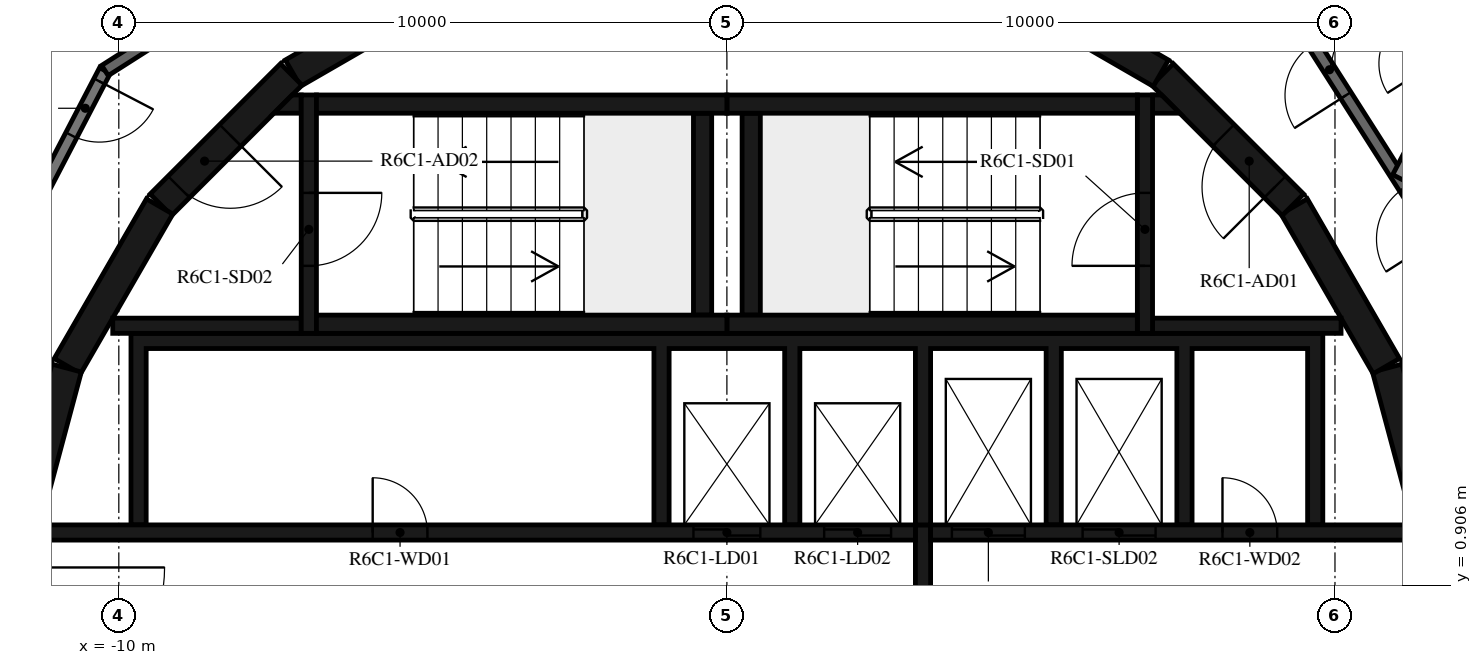
"""IFC4 building model, lengths in metres.
Left out: names, types, materials, properties, quantities, classifications, styles, units other than length and angle.
Written with IfcOpenShell. Run it as: python <this file> out.ifc"""

import sys

from ifc_helpers import new_model, si_unit, direction, frame, frame_2d, origin, place, context, subcontext, project, spatial, polyline, rectangle, outline, extrude, element, fill, save


model = new_model("IFC4")
c1 = context("Model", 3, precision=1e-05, world=origin(), true_north=direction((0.0, 1.0)))
c2 = subcontext(c1, "Body", "Model", "MODEL_VIEW")
j1 = project(units=[si_unit("LENGTHUNIT", "METRE"), si_unit("PLANEANGLEUNIT", "RADIAN")], contexts=[c1])
p1 = place(None, origin())
s1 = spatial("IfcSite", under=j1, at=p1, CompositionType="ELEMENT")
p2 = place(p1, origin())
s2 = spatial("IfcBuilding", under=s1, at=p2, CompositionType="ELEMENT")
p3 = place(p2, frame((0.0, 0.0, 251.2)))
s3 = spatial("IfcBuildingStorey", under=s2, at=p3, CompositionType="ELEMENT", Elevation=251.2)
for number, where, z_axis, x_axis in (
    (1, (11.643, 1.55, 0.0), (0.0, 0.0, 1.0), (-0.259, 0.966, 0.0)),
    (2, (10.845, 4.51, 0.0), (0.0, 0.0, 1.0), (-0.5, 0.866, 0.0)),
):
    element("IfcWall", number, at=place(p3, frame(where, z_axis=z_axis, x_axis=x_axis)), inside=s3, PredefinedType="SHEAR", context=c2, shape_type="SweptSolid", body=[
        extrude(rectangle(XDim=3.033, YDim=0.5, at=frame_2d((1.516, 0.0))), origin(), (0.0, 0.0, 1.0), 3.12),
    ])
p4 = place(p3, frame((9.308, 7.164, 0.0), z_axis=(0.0, 0.0, 1.0), x_axis=(-0.707106781187, 0.707106781187, 0.0)))
e3 = element("IfcWall", 3, at=p4, inside=s3, PredefinedType="SHEAR", context=c2, shape_type="SweptSolid", body=[
    extrude(rectangle(XDim=3.032, YDim=0.5, at=frame_2d((1.516, 0.0))), origin(), (0.0, 0.0, 1.0), 3.12),
])
p5 = place(p4, frame((0.416, 0.0, 0.0)))
e4 = element("IfcOpeningElement", 4, at=p5, cuts=e3, PredefinedType="OPENING", context=c2, shape_type="SweptSolid", body=[
    extrude(rectangle(XDim=1.2, YDim=2.1, at=frame_2d((0.6, 1.05))), frame((0.0, 0.26, 0.0), z_axis=(0.0, -1.0, 0.0), x_axis=(1.0, 0.0, 0.0)), (0.0, 0.0, 1.0), 0.52),
])
for number, where, z_axis, x_axis in (
    (5, (7.137, 9.329, 0.0), (0.0, 0.0, 1.0), (-0.866, 0.5, 0.0)),
    (6, (-4.51, 10.845, 0.0), (0.0, 0.0, 1.0), (-0.866, -0.5, 0.0)),
):
    element("IfcWall", number, at=place(p3, frame(where, z_axis=z_axis, x_axis=x_axis)), inside=s3, PredefinedType="SHEAR", context=c2, shape_type="SweptSolid", body=[
        extrude(rectangle(XDim=3.033, YDim=0.5, at=frame_2d((1.516, 0.0))), origin(), (0.0, 0.0, 1.0), 3.12),
    ])
p6 = place(p3, frame((-7.164, 9.308, 0.0), z_axis=(0.0, 0.0, 1.0), x_axis=(-0.707106781187, -0.707106781187, 0.0)))
e7 = element("IfcWall", 7, at=p6, inside=s3, PredefinedType="SHEAR", context=c2, shape_type="SweptSolid", body=[
    extrude(rectangle(XDim=3.032, YDim=0.5, at=frame_2d((1.516, 0.0))), origin(), (0.0, 0.0, 1.0), 3.12),
])
p7 = place(p6, frame((1.416, 0.0, 0.0)))
e8 = element("IfcOpeningElement", 8, at=p7, cuts=e7, PredefinedType="OPENING", context=c2, shape_type="SweptSolid", body=[
    extrude(rectangle(XDim=1.2, YDim=2.1, at=frame_2d((0.6, 1.05))), frame((0.0, 0.26, 0.0), z_axis=(0.0, -1.0, 0.0), x_axis=(1.0, 0.0, 0.0)), (0.0, 0.0, 1.0), 0.52),
])
for number, where, z_axis, x_axis in (
    (9, (-9.329, 7.137, 0.0), (0.0, 0.0, 1.0), (-0.5, -0.866, 0.0)),
    (10, (-10.858, 4.479, 0.0), (0.0, 0.0, 1.0), (-0.259, -0.966, 0.0)),
):
    element("IfcWall", number, at=place(p3, frame(where, z_axis=z_axis, x_axis=x_axis)), inside=s3, PredefinedType="SHEAR", context=c2, shape_type="SweptSolid", body=[
        extrude(rectangle(XDim=3.033, YDim=0.5, at=frame_2d((1.516, 0.0))), origin(), (0.0, 0.0, 1.0), 3.12),
    ])
for number, where, z_axis, x_axis in (
    (11, (0.0, 5.2, 0.0), (0.0, 0.0, 1.0), (1.0, 0.0, 0.0)),
    (12, (0.0, 8.82, 0.0), (0.0, 0.0, 1.0), (1.0, 0.0, 0.0)),
):
    element("IfcWall", number, at=place(p3, frame(where, z_axis=z_axis, x_axis=x_axis)), inside=s3, PredefinedType="SHEAR", context=c2, shape_type="SweptSolid", body=[
        extrude(rectangle(XDim=6.75, YDim=0.3, at=frame_2d((3.375, 0.0))), origin(), (0.0, 0.0, 1.0), 3.12),
    ])
p8 = place(p3, frame((0.4, 5.35, 0.0), z_axis=(0.0, 0.0, 1.0), x_axis=(0.0, 1.0, 0.0)))
e13 = element("IfcWall", 13, at=p8, inside=s3, PredefinedType="SHEAR", context=c2, shape_type="SweptSolid", body=[
    extrude(rectangle(XDim=3.32, YDim=0.3, at=frame_2d((1.66, 0.0))), origin(), (0.0, 0.0, 1.0), 3.12),
])
p9 = place(p3, frame((6.875, 5.05, 0.0), z_axis=(0.0, 0.0, 1.0), x_axis=(0.0, 1.0, 0.0)))
e14 = element("IfcWall", 14, at=p9, inside=s3, PredefinedType="SHEAR", context=c2, shape_type="SweptSolid", body=[
    extrude(rectangle(XDim=3.92, YDim=0.25, at=frame_2d((1.96, 0.0))), origin(), (0.0, 0.0, 1.0), 3.12),
])
p10 = place(p9, frame((1.11, 0.0, 0.0)))
e15 = element("IfcOpeningElement", 15, at=p10, cuts=e14, PredefinedType="OPENING", context=c2, shape_type="SweptSolid", body=[
    extrude(rectangle(XDim=1.2, YDim=2.1, at=frame_2d((0.6, 1.05))), frame((0.0, 0.135, 0.0), z_axis=(0.0, -1.0, 0.0), x_axis=(1.0, 0.0, 0.0)), (0.0, 0.0, 1.0), 0.27),
])
p11 = place(p3, frame((7.0, 5.175, 0.0), z_axis=(0.0, 0.0, 1.0), x_axis=(1.0, 0.0, 0.0)))
e16 = element("IfcWall", 16, at=p11, inside=s3, PredefinedType="SHEAR", context=c2, shape_type="SweptSolid", body=[
    extrude(rectangle(XDim=3.1, YDim=0.25, at=frame_2d((1.55, 0.0))), origin(), (0.0, 0.0, 1.0), 3.12),
])
p12 = place(p3, origin())
e17 = element("IfcWall", 17, at=p12, inside=s3, PredefinedType="SHEAR", context=c2, shape_type="SweptSolid", body=[
    extrude(outline(polyline([(7.448, 8.67), (7.0, 8.67), (7.0, 8.97), (7.148, 8.97), (7.448, 8.67)])), origin(), (0.0, 0.0, 1.0), 3.12),
])
for number, where, z_axis, x_axis in (
    (18, (-6.75, 5.2, 0.0), (0.0, 0.0, 1.0), (1.0, 0.0, 0.0)),
    (19, (-6.75, 8.82, 0.0), (0.0, 0.0, 1.0), (1.0, 0.0, 0.0)),
):
    element("IfcWall", number, at=place(p3, frame(where, z_axis=z_axis, x_axis=x_axis)), inside=s3, PredefinedType="SHEAR", context=c2, shape_type="SweptSolid", body=[
        extrude(rectangle(XDim=6.75, YDim=0.3, at=frame_2d((3.375, 0.0))), origin(), (0.0, 0.0, 1.0), 3.12),
    ])
p13 = place(p3, frame((-0.4, 5.35, 0.0), z_axis=(0.0, 0.0, 1.0), x_axis=(0.0, 1.0, 0.0)))
e20 = element("IfcWall", 20, at=p13, inside=s3, PredefinedType="SHEAR", context=c2, shape_type="SweptSolid", body=[
    extrude(rectangle(XDim=3.32, YDim=0.3, at=frame_2d((1.66, 0.0))), origin(), (0.0, 0.0, 1.0), 3.12),
])
p14 = place(p3, frame((-6.875, 8.97, 0.0), z_axis=(0.0, 0.0, 1.0), x_axis=(0.0, -1.0, 0.0)))
e21 = element("IfcWall", 21, at=p14, inside=s3, PredefinedType="SHEAR", context=c2, shape_type="SweptSolid", body=[
    extrude(rectangle(XDim=3.92, YDim=0.25, at=frame_2d((1.96, 0.0))), origin(), (0.0, 0.0, 1.0), 3.12),
])
p15 = place(p14, frame((1.61, 0.0, 0.0)))
e22 = element("IfcOpeningElement", 22, at=p15, cuts=e21, PredefinedType="OPENING", context=c2, shape_type="SweptSolid", body=[
    extrude(rectangle(XDim=1.2, YDim=2.1, at=frame_2d((0.6, 1.05))), frame((0.0, 0.135, 0.0), z_axis=(0.0, -1.0, 0.0), x_axis=(1.0, 0.0, 0.0)), (0.0, 0.0, 1.0), 0.27),
])
p16 = place(p3, frame((-7.0, 5.175, 0.0), z_axis=(0.0, 0.0, 1.0), x_axis=(-1.0, 0.0, 0.0)))
e23 = element("IfcWall", 23, at=p16, inside=s3, PredefinedType="SHEAR", context=c2, shape_type="SweptSolid", body=[
    extrude(rectangle(XDim=3.1, YDim=0.25, at=frame_2d((1.55, 0.0))), origin(), (0.0, 0.0, 1.0), 3.12),
])
p17 = place(p3, origin())
e24 = element("IfcWall", 24, at=p17, inside=s3, PredefinedType="SHEAR", context=c2, shape_type="SweptSolid", body=[
    extrude(outline(polyline([(-7.148, 8.97), (-7.0, 8.97), (-7.0, 8.67), (-7.448, 8.67), (-7.148, 8.97)])), origin(), (0.0, 0.0, 1.0), 3.12),
])
p18 = place(p3, origin())
e25 = element("IfcWall", 25, at=p18, inside=s3, PredefinedType="SHEAR", context=c2, shape_type="SweptSolid", body=[
    extrude(outline(polyline([(-9.55, 4.8), (-1.2, 4.8), (-1.2, 1.9), (-0.95, 1.9), (-0.95, 4.8), (0.95, 4.8), (0.95, 1.9), (1.2, 1.9), (1.2, 4.8), (3.1, 4.8), (3.1, 1.9), (3.35, 1.9), (3.35, 4.8), (5.25, 4.8), (5.25, 1.9), (5.5, 1.9), (5.5, 4.8), (7.4, 4.8), (7.4, 1.9), (7.65, 1.9), (7.65, 4.8), (9.55, 4.8), (9.55, 1.9), (9.8, 1.9), (9.8, 4.8), (9.8, 5.05), (-9.8, 5.05), (-9.8, 4.8), (-9.8, 1.9), (-9.55, 1.9), (-9.55, 4.8)])), origin(), (0.0, 0.0, 1.0), 3.12),
])
p19 = place(p3, frame((-11.28, 1.775, 0.0), z_axis=(0.0, 0.0, 1.0), x_axis=(1.0, 0.0, 0.0)))
e26 = element("IfcWall", 26, at=p19, inside=s3, PredefinedType="SHEAR", context=c2, shape_type="SweptSolid", body=[
    extrude(rectangle(XDim=14.38, YDim=0.25, at=frame_2d((7.19, 0.0))), origin(), (0.0, 0.0, 1.0), 3.12),
])
p20 = place(p19, frame((10.73, 0.0, 0.0)))
e27 = element("IfcOpeningElement", 27, at=p20, cuts=e26, PredefinedType="OPENING", context=c2, shape_type="SweptSolid", body=[
    extrude(rectangle(XDim=1.1, YDim=2.1, at=frame_2d((0.55, 1.05))), frame((0.0, 0.135, 0.0), z_axis=(0.0, -1.0, 0.0), x_axis=(1.0, 0.0, 0.0)), (0.0, 0.0, 1.0), 0.27),
])
p21 = place(p19, frame((12.88, 0.0, 0.0)))
e28 = element("IfcOpeningElement", 28, at=p21, cuts=e26, PredefinedType="OPENING", context=c2, shape_type="SweptSolid", body=[
    extrude(rectangle(XDim=1.1, YDim=2.1, at=frame_2d((0.55, 1.05))), frame((0.0, 0.135, 0.0), z_axis=(0.0, -1.0, 0.0), x_axis=(1.0, 0.0, 0.0)), (0.0, 0.0, 1.0), 0.27),
])
p22 = place(p19, frame((5.455, 0.0, 0.0)))
e29 = element("IfcOpeningElement", 29, at=p22, cuts=e26, PredefinedType="OPENING", context=c2, shape_type="SweptSolid", body=[
    extrude(rectangle(XDim=0.9, YDim=2.1, at=frame_2d((0.45, 1.05))), frame((0.0, 0.135, 0.0), z_axis=(0.0, -1.0, 0.0), x_axis=(1.0, 0.0, 0.0)), (0.0, 0.0, 1.0), 0.27),
])
p23 = place(p3, frame((3.35, 1.775, 0.0), z_axis=(0.0, 0.0, 1.0), x_axis=(1.0, 0.0, 0.0)))
e30 = element("IfcWall", 30, at=p23, inside=s3, PredefinedType="SHEAR", context=c2, shape_type="SweptSolid", body=[
    extrude(rectangle(XDim=7.93, YDim=0.25, at=frame_2d((3.965, 0.0))), origin(), (0.0, 0.0, 1.0), 3.12),
])
p24 = place(p23, frame((0.35, 0.0, 0.0)))
e31 = element("IfcOpeningElement", 31, at=p24, cuts=e30, PredefinedType="OPENING", context=c2, shape_type="SweptSolid", body=[
    extrude(rectangle(XDim=1.2, YDim=2.4, at=frame_2d((0.6, 1.2))), frame((0.0, 0.135, 0.0), z_axis=(0.0, -1.0, 0.0), x_axis=(1.0, 0.0, 0.0)), (0.0, 0.0, 1.0), 0.27),
])
p25 = place(p23, frame((2.5, 0.0, 0.0)))
e32 = element("IfcOpeningElement", 32, at=p25, cuts=e30, PredefinedType="OPENING", context=c2, shape_type="SweptSolid", body=[
    extrude(rectangle(XDim=1.2, YDim=2.4, at=frame_2d((0.6, 1.2))), frame((0.0, 0.135, 0.0), z_axis=(0.0, -1.0, 0.0), x_axis=(1.0, 0.0, 0.0)), (0.0, 0.0, 1.0), 0.27),
])
p26 = place(p23, frame((4.8, 0.0, 0.0)))
e33 = element("IfcOpeningElement", 33, at=p26, cuts=e30, PredefinedType="OPENING", context=c2, shape_type="SweptSolid", body=[
    extrude(rectangle(XDim=0.9, YDim=2.1, at=frame_2d((0.45, 1.05))), frame((0.0, 0.135, 0.0), z_axis=(0.0, -1.0, 0.0), x_axis=(1.0, 0.0, 0.0)), (0.0, 0.0, 1.0), 0.27),
])
p27 = place(p3, frame((3.225, -1.9, 0.0), z_axis=(0.0, 0.0, 1.0), x_axis=(0.0, 1.0, 0.0)))
e34 = element("IfcWall", 34, at=p27, inside=s3, PredefinedType="SHEAR", context=c2, shape_type="SweptSolid", body=[
    extrude(rectangle(XDim=3.8, YDim=0.25, at=frame_2d((1.9, 0.0))), origin(), (0.0, 0.0, 1.0), 3.12),
])
p28 = place(p3, frame((13.231, 4.172, 0.0), z_axis=(0.0, 0.0, 1.0), x_axis=(-0.537304397561, 0.843388394728, 0.0)))
e35 = element("IfcWall", 35, at=p28, inside=s3, PredefinedType="STANDARD", context=c2, shape_type="SweptSolid", body=[
    extrude(rectangle(XDim=7.181, YDim=0.2, at=frame_2d((3.59, 0.0))), origin(), (0.0, 0.0, 1.0), 3.12),
])
p29 = place(p28, frame((2.881, 0.0, 0.0)))
e36 = element("IfcOpeningElement", 36, at=p29, cuts=e35, PredefinedType="OPENING", context=c2, shape_type="SweptSolid", body=[
    extrude(rectangle(XDim=1.0, YDim=2.1, at=frame_2d((0.5, 1.05))), frame((0.0, 0.11, 0.0), z_axis=(0.0, -1.0, 0.0), x_axis=(1.0, 0.0, 0.0)), (0.0, 0.0, 1.0), 0.22),
])
p30 = place(p28, frame((5.681, 0.0, 0.0)))
e37 = element("IfcOpeningElement", 37, at=p30, cuts=e35, PredefinedType="OPENING", context=c2, shape_type="SweptSolid", body=[
    extrude(rectangle(XDim=1.0, YDim=2.1, at=frame_2d((0.5, 1.05))), frame((0.0, 0.11, 0.0), z_axis=(0.0, -1.0, 0.0), x_axis=(1.0, 0.0, 0.0)), (0.0, 0.0, 1.0), 0.22),
])
p31 = place(p3, frame((-10.228, 9.372, 0.0), z_axis=(0.0, 0.0, 1.0), x_axis=(-0.461759464021, -0.887005184532, 0.0)))
e38 = element("IfcWall", 38, at=p31, inside=s3, PredefinedType="STANDARD", context=c2, shape_type="SweptSolid", body=[
    extrude(rectangle(XDim=7.181, YDim=0.2, at=frame_2d((3.591, 0.0))), origin(), (0.0, 0.0, 1.0), 3.12),
])
p32 = place(p31, frame((0.2, 0.0, 0.0)))
e39 = element("IfcOpeningElement", 39, at=p32, cuts=e38, PredefinedType="OPENING", context=c2, shape_type="SweptSolid", body=[
    extrude(rectangle(XDim=1.0, YDim=2.1, at=frame_2d((0.5, 1.05))), frame((0.0, 0.11, 0.0), z_axis=(0.0, -1.0, 0.0), x_axis=(1.0, 0.0, 0.0)), (0.0, 0.0, 1.0), 0.22),
])
p33 = place(p3, frame((-4.172, 13.231, 0.0), z_axis=(0.0, 0.0, 1.0), x_axis=(-0.843388394728, -0.537304397561, 0.0)))
e40 = element("IfcWall", 40, at=p33, inside=s3, PredefinedType="STANDARD", context=c2, shape_type="SweptSolid", body=[
    extrude(rectangle(XDim=7.181, YDim=0.2, at=frame_2d((3.59, 0.0))), origin(), (0.0, 0.0, 1.0), 3.12),
])
p34 = place(p3, frame((13.801, 12.922, 0.0), z_axis=(0.0, 0.0, 1.0), x_axis=(-0.461726485624, -0.887022351733, 0.0)))
e41 = element("IfcWall", 41, at=p34, inside=s3, PredefinedType="STANDARD", context=c2, shape_type="SweptSolid", body=[
    extrude(rectangle(XDim=5.984, YDim=0.2, at=frame_2d((2.992, 0.0))), origin(), (0.0, 0.0, 1.0), 2.73),
])
p35 = place(p3, frame((11.838, 9.15, 0.0), z_axis=(0.0, 0.0, 1.0), x_axis=(-0.537288949014, 0.843398236462, 0.0)))
e42 = element("IfcWall", 42, at=p35, inside=s3, PredefinedType="PARTITIONING", context=c2, shape_type="SweptSolid", body=[
    extrude(rectangle(XDim=2.636, YDim=0.12, at=frame_2d((1.318, 0.0))), origin(), (0.0, 0.0, 1.0), 3.12),
])
p36 = place(p35, frame((0.4, 0.0, 0.0)))
e43 = element("IfcOpeningElement", 43, at=p36, cuts=e42, PredefinedType="OPENING", context=c2, shape_type="SweptSolid", body=[
    extrude(rectangle(XDim=0.9, YDim=2.1, at=frame_2d((0.45, 1.05))), frame((0.0, 0.07, 0.0), z_axis=(0.0, -1.0, 0.0), x_axis=(1.0, 0.0, 0.0)), (0.0, 0.0, 1.0), 0.14),
])
p37 = place(p10, origin())
e44 = element("IfcDoor", 44, at=p37, inside=s3, OperationType="SINGLE_SWING_LEFT", PredefinedType="DOOR", context=c2, shape_type="SweptSolid", body=[
    extrude(rectangle(XDim=1.2, YDim=2.1, at=frame_2d((0.6, 1.05))), frame((0.0, 0.025, 0.0), z_axis=(0.0, -1.0, 0.0), x_axis=(1.0, 0.0, 0.0)), (0.0, 0.0, 1.0), 0.05),
])
fill(e15, e44)
p38 = place(p5, origin())
e45 = element("IfcDoor", 45, at=p38, inside=s3, OperationType="SINGLE_SWING_RIGHT", PredefinedType="DOOR", context=c2, shape_type="SweptSolid", body=[
    extrude(rectangle(XDim=1.2, YDim=2.1, at=frame_2d((0.6, 1.05))), frame((0.0, 0.025, 0.0), z_axis=(0.0, -1.0, 0.0), x_axis=(1.0, 0.0, 0.0)), (0.0, 0.0, 1.0), 0.05),
])
fill(e4, e45)
p39 = place(p15, origin())
e46 = element("IfcDoor", 46, at=p39, inside=s3, OperationType="SINGLE_SWING_LEFT", PredefinedType="DOOR", context=c2, shape_type="SweptSolid", body=[
    extrude(rectangle(XDim=1.2, YDim=2.1, at=frame_2d((0.6, 1.05))), frame((0.0, 0.025, 0.0), z_axis=(0.0, -1.0, 0.0), x_axis=(1.0, 0.0, 0.0)), (0.0, 0.0, 1.0), 0.05),
])
fill(e22, e46)
p40 = place(p7, origin())
e47 = element("IfcDoor", 47, at=p40, inside=s3, OperationType="SINGLE_SWING_RIGHT", PredefinedType="DOOR", context=c2, shape_type="SweptSolid", body=[
    extrude(rectangle(XDim=1.2, YDim=2.1, at=frame_2d((0.6, 1.05))), frame((0.0, 0.025, 0.0), z_axis=(0.0, -1.0, 0.0), x_axis=(1.0, 0.0, 0.0)), (0.0, 0.0, 1.0), 0.05),
])
fill(e8, e47)
p41 = place(p20, origin())
e48 = element("IfcDoor", 48, at=p41, inside=s3, OperationType="DOUBLE_DOOR_SLIDING", PredefinedType="DOOR", context=c2, shape_type="SweptSolid", body=[
    extrude(rectangle(XDim=1.1, YDim=2.1, at=frame_2d((0.55, 1.05))), frame((0.0, 0.025, 0.0), z_axis=(0.0, -1.0, 0.0), x_axis=(1.0, 0.0, 0.0)), (0.0, 0.0, 1.0), 0.05),
])
fill(e27, e48)
p42 = place(p21, origin())
e49 = element("IfcDoor", 49, at=p42, inside=s3, OperationType="DOUBLE_DOOR_SLIDING", PredefinedType="DOOR", context=c2, shape_type="SweptSolid", body=[
    extrude(rectangle(XDim=1.1, YDim=2.1, at=frame_2d((0.55, 1.05))), frame((0.0, 0.025, 0.0), z_axis=(0.0, -1.0, 0.0), x_axis=(1.0, 0.0, 0.0)), (0.0, 0.0, 1.0), 0.05),
])
fill(e28, e49)
p43 = place(p24, origin())
e50 = element("IfcDoor", 50, at=p43, inside=s3, OperationType="DOUBLE_DOOR_SLIDING", PredefinedType="DOOR", context=c2, shape_type="SweptSolid", body=[
    extrude(rectangle(XDim=1.2, YDim=2.4, at=frame_2d((0.6, 1.2))), frame((0.0, 0.025, 0.0), z_axis=(0.0, -1.0, 0.0), x_axis=(1.0, 0.0, 0.0)), (0.0, 0.0, 1.0), 0.05),
])
fill(e31, e50)
p44 = place(p25, origin())
e51 = element("IfcDoor", 51, at=p44, inside=s3, OperationType="DOUBLE_DOOR_SLIDING", PredefinedType="DOOR", context=c2, shape_type="SweptSolid", body=[
    extrude(rectangle(XDim=1.2, YDim=2.4, at=frame_2d((0.6, 1.2))), frame((0.0, 0.025, 0.0), z_axis=(0.0, -1.0, 0.0), x_axis=(1.0, 0.0, 0.0)), (0.0, 0.0, 1.0), 0.05),
])
fill(e32, e51)
p45 = place(p22, origin())
e52 = element("IfcDoor", 52, at=p45, inside=s3, OperationType="SINGLE_SWING_LEFT", PredefinedType="DOOR", context=c2, shape_type="SweptSolid", body=[
    extrude(rectangle(XDim=0.9, YDim=2.1, at=frame_2d((0.45, 1.05))), frame((0.0, 0.025, 0.0), z_axis=(0.0, -1.0, 0.0), x_axis=(1.0, 0.0, 0.0)), (0.0, 0.0, 1.0), 0.05),
])
fill(e29, e52)
p46 = place(p26, origin())
e53 = element("IfcDoor", 53, at=p46, inside=s3, OperationType="SINGLE_SWING_RIGHT", PredefinedType="DOOR", context=c2, shape_type="SweptSolid", body=[
    extrude(rectangle(XDim=0.9, YDim=2.1, at=frame_2d((0.45, 1.05))), frame((0.0, 0.025, 0.0), z_axis=(0.0, -1.0, 0.0), x_axis=(1.0, 0.0, 0.0)), (0.0, 0.0, 1.0), 0.05),
])
fill(e33, e53)
p47 = place(p30, origin())
e54 = element("IfcDoor", 54, at=p47, inside=s3, OperationType="SINGLE_SWING_LEFT", PredefinedType="DOOR", context=c2, shape_type="SweptSolid", body=[
    extrude(rectangle(XDim=1.0, YDim=2.1, at=frame_2d((0.5, 1.05))), frame((0.0, 0.025, 0.0), z_axis=(0.0, -1.0, 0.0), x_axis=(1.0, 0.0, 0.0)), (0.0, 0.0, 1.0), 0.05),
])
fill(e37, e54)
p48 = place(p32, origin())
e55 = element("IfcDoor", 55, at=p48, inside=s3, OperationType="SINGLE_SWING_LEFT", PredefinedType="DOOR", context=c2, shape_type="SweptSolid", body=[
    extrude(rectangle(XDim=1.0, YDim=2.1, at=frame_2d((0.5, 1.05))), frame((0.0, 0.025, 0.0), z_axis=(0.0, -1.0, 0.0), x_axis=(1.0, 0.0, 0.0)), (0.0, 0.0, 1.0), 0.05),
])
fill(e39, e55)
save(model, sys.argv[1])
